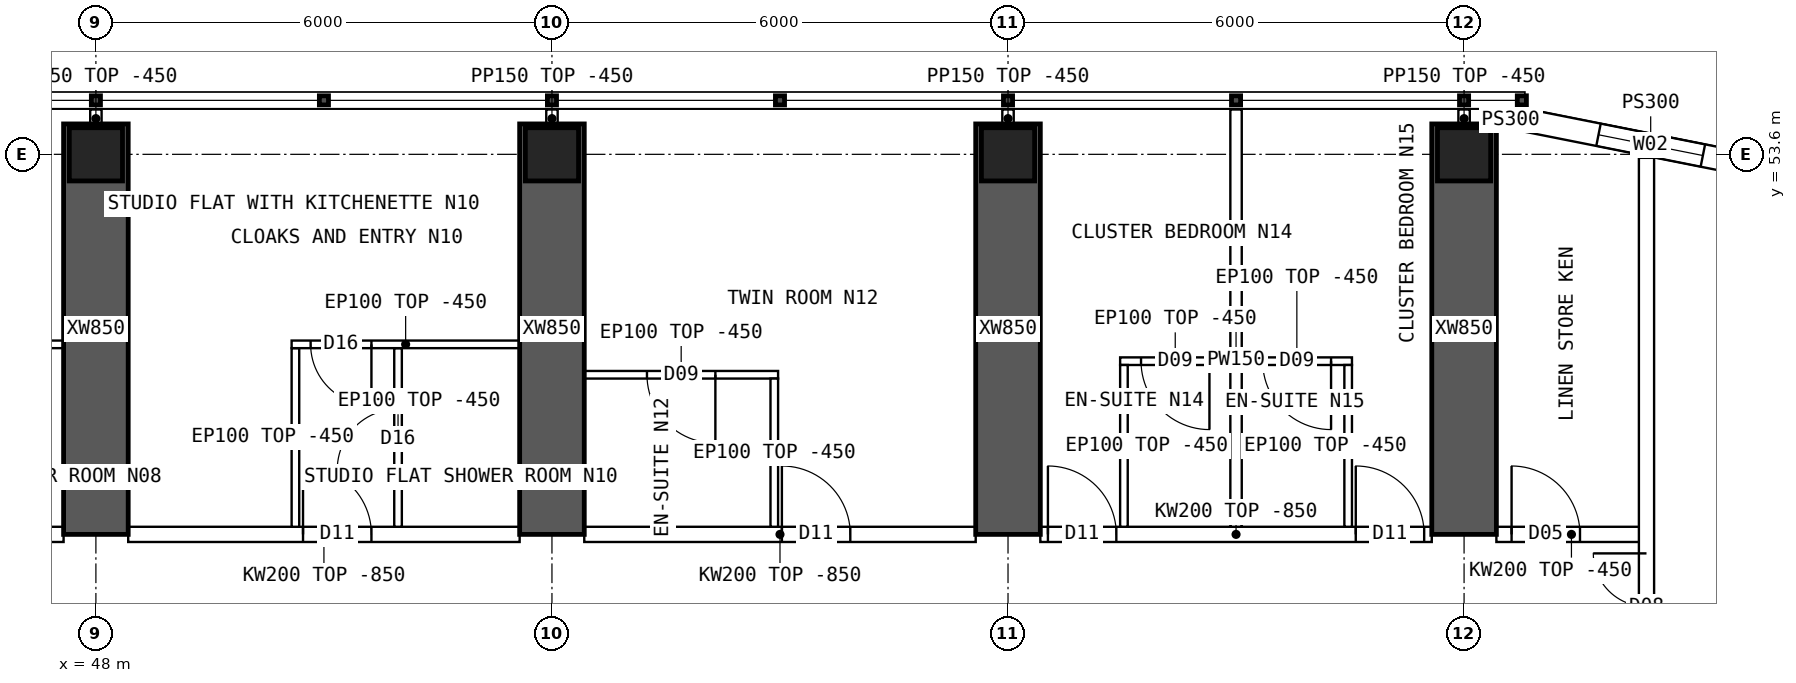
"""IFC4 building model, lengths in metres.
Left out: names, types, materials, properties, quantities, classifications, styles, units other than length and angle.
Written with IfcOpenShell. Run it as: python <this file> out.ifc"""

import sys

from ifc_helpers import new_model, si_unit, direction, frame, frame_2d, origin, origin_2d, place, context, subcontext, project, spatial, polyline, rectangle, hollow_rectangle, outline, extrude, element, fill, save


model = new_model("IFC4")
c1 = context("Model", 3, precision=1e-05, world=origin(), true_north=direction((0.0, 1.0)))
c2 = subcontext(c1, "Body", "Model", "MODEL_VIEW")
j1 = project(units=[si_unit("LENGTHUNIT", "METRE"), si_unit("PLANEANGLEUNIT", "RADIAN")], contexts=[c1])
p1 = place(None, origin())
s1 = spatial("IfcSite", under=j1, at=p1, CompositionType="ELEMENT")
p2 = place(p1, origin())
s2 = spatial("IfcBuilding", under=s1, at=p2, CompositionType="ELEMENT")
p3 = place(p2, frame((0.0, 0.0, 159.85)))
s3 = spatial("IfcBuildingStorey", under=s2, at=p3, CompositionType="ELEMENT", Elevation=159.85)
for number, where, z_axis, x_axis in (
    (1, (48.0, 53.6, 0.0), (0.0, 0.0, 1.0), (1.0, 0.0, 0.0)),
    (2, (54.0, 53.6, 0.0), (0.0, 0.0, 1.0), (1.0, 0.0, 0.0)),
    (3, (60.0, 53.6, 0.0), (0.0, 0.0, 1.0), (1.0, 0.0, 0.0)),
    (4, (66.0, 53.6, 0.0), (0.0, 0.0, 1.0), (1.0, 0.0, 0.0)),
):
    element("IfcColumn", number, at=place(p3, frame(where, z_axis=z_axis, x_axis=x_axis)), inside=s3, PredefinedType="COLUMN", context=c2, shape_type="SweptSolid", body=[
        extrude(hollow_rectangle(XDim=0.7, YDim=0.7, WallThickness=0.07, at=origin_2d()), origin(), (0.0, 0.0, 1.0), 3.75),
    ])
for number, where, z_axis, x_axis in (
    (5, (48.0, 48.6, 0.0), (0.0, 0.0, 1.0), (0.0, 1.0, 0.0)),
    (6, (54.0, 48.6, 0.0), (0.0, 0.0, 1.0), (0.0, 1.0, 0.0)),
    (7, (60.0, 48.6, 0.0), (0.0, 0.0, 1.0), (0.0, 1.0, 0.0)),
    (8, (66.0, 48.6, 0.0), (0.0, 0.0, 1.0), (0.0, 1.0, 0.0)),
):
    element("IfcWall", number, at=place(p3, frame(where, z_axis=z_axis, x_axis=x_axis)), inside=s3, PredefinedType="SHEAR", context=c2, shape_type="SweptSolid", body=[
        extrude(rectangle(XDim=5.4, YDim=0.85, at=frame_2d((2.7, 0.0))), origin(), (0.0, 0.0, 1.0), 3.75),
    ])
p4 = place(p3, frame((70.11, 53.392, 0.0), z_axis=(0.0, 0.0, 1.0), x_axis=(-0.98078325777, 0.195100490205, 0.0)))
e9 = element("IfcWall", 9, at=p4, inside=s3, PredefinedType="SOLIDWALL", context=c2, shape_type="SweptSolid", body=[
    extrude(outline(polyline([(-0.03, -0.15), (3.405, -0.15), (3.345, 0.15), (0.03, 0.15), (-0.03, -0.15)])), origin(), (0.0, 0.0, 1.0), 3.3),
])
p5 = place(p4, frame((0.988, 0.0, 0.9)))
e10 = element("IfcOpeningElement", 10, at=p5, cuts=e9, PredefinedType="OPENING", context=c2, shape_type="SweptSolid", body=[
    extrude(rectangle(XDim=1.4, YDim=1.8, at=frame_2d((0.7, 0.9))), frame((0.0, 0.16, 0.0), z_axis=(0.0, -1.0, 0.0), x_axis=(1.0, 0.0, 0.0)), (0.0, 0.0, 1.0), 0.32),
])
p6 = place(p3, frame((66.8, 54.05, 0.0), z_axis=(0.0, 0.0, 1.0), x_axis=(-1.0, 0.0, 0.0)))
e11 = element("IfcWall", 11, at=p6, inside=s3, PredefinedType="SOLIDWALL", context=c2, shape_type="SweptSolid", body=[
    extrude(rectangle(XDim=0.375, YDim=0.3, at=frame_2d((0.188, 0.0))), origin(), (0.0, 0.0, 1.0), 3.3),
])
p7 = place(p3, frame((42.425, 48.6, 0.0), z_axis=(0.0, 0.0, 1.0), x_axis=(1.0, 0.0, 0.0)))
e12 = element("IfcWall", 12, at=p7, inside=s3, PredefinedType="SOLIDWALL", context=c2, shape_type="SweptSolid", body=[
    extrude(outline(polyline([(0.0, 0.0), (5.15, 0.0), (5.15, 2.9), (0.0, 2.9), (0.0, 0.0)])), frame((0.0, 0.1, 0.0), z_axis=(0.0, -1.0, 0.0), x_axis=(1.0, 0.0, 0.0)), (0.0, 0.0, 1.0), 0.2),
])
p8 = place(p7, frame((2.3, 0.0, 0.0)))
e13 = element("IfcOpeningElement", 13, at=p8, cuts=e12, PredefinedType="OPENING", context=c2, shape_type="SweptSolid", body=[
    extrude(rectangle(XDim=0.9, YDim=2.1, at=frame_2d((0.45, 1.05))), frame((0.0, 0.11, 0.0), z_axis=(0.0, -1.0, 0.0), x_axis=(1.0, 0.0, 0.0)), (0.0, 0.0, 1.0), 0.22),
])
p9 = place(p3, frame((48.425, 48.6, 0.0), z_axis=(0.0, 0.0, 1.0), x_axis=(1.0, 0.0, 0.0)))
e14 = element("IfcWall", 14, at=p9, inside=s3, PredefinedType="SOLIDWALL", context=c2, shape_type="SweptSolid", body=[
    extrude(outline(polyline([(0.0, 0.0), (5.15, 0.0), (5.15, 2.9), (0.0, 2.9), (0.0, 0.0)])), frame((0.0, 0.1, 0.0), z_axis=(0.0, -1.0, 0.0), x_axis=(1.0, 0.0, 0.0)), (0.0, 0.0, 1.0), 0.2),
])
p10 = place(p9, frame((2.3, 0.0, 0.0)))
e15 = element("IfcOpeningElement", 15, at=p10, cuts=e14, PredefinedType="OPENING", context=c2, shape_type="SweptSolid", body=[
    extrude(rectangle(XDim=0.9, YDim=2.1, at=frame_2d((0.45, 1.05))), frame((0.0, 0.11, 0.0), z_axis=(0.0, -1.0, 0.0), x_axis=(1.0, 0.0, 0.0)), (0.0, 0.0, 1.0), 0.22),
])
p11 = place(p3, frame((54.425, 48.6, 0.0), z_axis=(0.0, 0.0, 1.0), x_axis=(1.0, 0.0, 0.0)))
e16 = element("IfcWall", 16, at=p11, inside=s3, PredefinedType="SOLIDWALL", context=c2, shape_type="SweptSolid", body=[
    extrude(outline(polyline([(0.0, 0.0), (5.15, 0.0), (5.15, 2.9), (0.0, 2.9), (0.0, 0.0)])), frame((0.0, 0.1, 0.0), z_axis=(0.0, -1.0, 0.0), x_axis=(1.0, 0.0, 0.0)), (0.0, 0.0, 1.0), 0.2),
])
p12 = place(p11, frame((2.6, 0.0, 0.0)))
e17 = element("IfcOpeningElement", 17, at=p12, cuts=e16, PredefinedType="OPENING", context=c2, shape_type="SweptSolid", body=[
    extrude(rectangle(XDim=0.9, YDim=2.1, at=frame_2d((0.45, 1.05))), frame((0.0, 0.11, 0.0), z_axis=(0.0, -1.0, 0.0), x_axis=(1.0, 0.0, 0.0)), (0.0, 0.0, 1.0), 0.22),
])
p13 = place(p3, frame((60.425, 48.6, 0.0), z_axis=(0.0, 0.0, 1.0), x_axis=(1.0, 0.0, 0.0)))
e18 = element("IfcWall", 18, at=p13, inside=s3, PredefinedType="SOLIDWALL", context=c2, shape_type="SweptSolid", body=[
    extrude(outline(polyline([(0.0, 0.0), (5.15, 0.0), (5.15, 2.9), (0.0, 2.9), (0.0, 0.0)])), frame((0.0, 0.1, 0.0), z_axis=(0.0, -1.0, 0.0), x_axis=(1.0, 0.0, 0.0)), (0.0, 0.0, 1.0), 0.2),
])
p14 = place(p13, frame((0.1, 0.0, 0.0)))
e19 = element("IfcOpeningElement", 19, at=p14, cuts=e18, PredefinedType="OPENING", context=c2, shape_type="SweptSolid", body=[
    extrude(rectangle(XDim=0.9, YDim=2.1, at=frame_2d((0.45, 1.05))), frame((0.0, 0.11, 0.0), z_axis=(0.0, -1.0, 0.0), x_axis=(1.0, 0.0, 0.0)), (0.0, 0.0, 1.0), 0.22),
])
p15 = place(p13, frame((4.15, 0.0, 0.0)))
e20 = element("IfcOpeningElement", 20, at=p15, cuts=e18, PredefinedType="OPENING", context=c2, shape_type="SweptSolid", body=[
    extrude(rectangle(XDim=0.9, YDim=2.1, at=frame_2d((0.45, 1.05))), frame((0.0, 0.11, 0.0), z_axis=(0.0, -1.0, 0.0), x_axis=(1.0, 0.0, 0.0)), (0.0, 0.0, 1.0), 0.22),
])
p16 = place(p3, frame((66.425, 48.6, 0.0), z_axis=(0.0, 0.0, 1.0), x_axis=(1.0, 0.0, 0.0)))
e21 = element("IfcWall", 21, at=p16, inside=s3, PredefinedType="SOLIDWALL", context=c2, shape_type="SweptSolid", body=[
    extrude(rectangle(XDim=1.975, YDim=0.2, at=frame_2d((0.987, 0.0))), origin(), (0.0, 0.0, 1.0), 3.3),
])
p17 = place(p16, frame((0.2, 0.0, 0.0)))
e22 = element("IfcOpeningElement", 22, at=p17, cuts=e21, PredefinedType="OPENING", context=c2, shape_type="SweptSolid", body=[
    extrude(rectangle(XDim=0.9, YDim=2.1, at=frame_2d((0.45, 1.05))), frame((0.0, 0.11, 0.0), z_axis=(0.0, -1.0, 0.0), x_axis=(1.0, 0.0, 0.0)), (0.0, 0.0, 1.0), 0.22),
])
p18 = place(p3, frame((44.575, 51.1, 0.0), z_axis=(0.0, 0.0, 1.0), x_axis=(1.0, 0.0, 0.0)))
e23 = element("IfcWall", 23, at=p18, inside=s3, PredefinedType="PARTITIONING", context=c2, shape_type="SweptSolid", body=[
    extrude(rectangle(XDim=3.0, YDim=0.1, at=frame_2d((1.5, 0.0))), origin(), (0.0, 0.0, 1.0), 3.3),
])
p19 = place(p18, frame((0.25, 0.0, 0.0)))
e24 = element("IfcOpeningElement", 24, at=p19, cuts=e23, PredefinedType="OPENING", context=c2, shape_type="SweptSolid", body=[
    extrude(rectangle(XDim=0.8, YDim=2.1, at=frame_2d((0.4, 1.05))), frame((0.0, 0.06, 0.0), z_axis=(0.0, -1.0, 0.0), x_axis=(1.0, 0.0, 0.0)), (0.0, 0.0, 1.0), 0.12),
])
p20 = place(p3, frame((50.575, 51.1, 0.0), z_axis=(0.0, 0.0, 1.0), x_axis=(1.0, 0.0, 0.0)))
e25 = element("IfcWall", 25, at=p20, inside=s3, PredefinedType="PARTITIONING", context=c2, shape_type="SweptSolid", body=[
    extrude(rectangle(XDim=3.0, YDim=0.1, at=frame_2d((1.5, 0.0))), origin(), (0.0, 0.0, 1.0), 3.3),
])
p21 = place(p20, frame((0.25, 0.0, 0.0)))
e26 = element("IfcOpeningElement", 26, at=p21, cuts=e25, PredefinedType="OPENING", context=c2, shape_type="SweptSolid", body=[
    extrude(rectangle(XDim=0.8, YDim=2.1, at=frame_2d((0.4, 1.05))), frame((0.0, 0.06, 0.0), z_axis=(0.0, -1.0, 0.0), x_axis=(1.0, 0.0, 0.0)), (0.0, 0.0, 1.0), 0.12),
])
p22 = place(p3, frame((50.625, 51.05, 0.0), z_axis=(0.0, 0.0, 1.0), x_axis=(0.0, -1.0, 0.0)))
e27 = element("IfcWall", 27, at=p22, inside=s3, PredefinedType="PARTITIONING", context=c2, shape_type="SweptSolid", body=[
    extrude(outline(polyline([(0.0, 0.0), (2.35, 0.0), (2.35, 2.9), (2.302, 2.9), (2.3, 3.3), (0.0, 3.3), (0.0, 0.0)])), frame((0.0, 0.05, 0.0), z_axis=(0.0, -1.0, 0.0), x_axis=(1.0, 0.0, 0.0)), (0.0, 0.0, 1.0), 0.1),
])
p23 = place(p3, frame((51.975, 51.05, 0.0), z_axis=(0.0, 0.0, 1.0), x_axis=(0.0, -1.0, 0.0)))
e28 = element("IfcWall", 28, at=p23, inside=s3, PredefinedType="PARTITIONING", context=c2, shape_type="SweptSolid", body=[
    extrude(outline(polyline([(0.0, 0.0), (2.35, 0.0), (2.35, 2.9), (2.302, 2.9), (2.3, 3.3), (0.0, 3.3), (0.0, 0.0)])), frame((0.0, 0.05, 0.0), z_axis=(0.0, -1.0, 0.0), x_axis=(1.0, 0.0, 0.0)), (0.0, 0.0, 1.0), 0.1),
])
p24 = place(p23, frame((0.8, 0.0, 0.0)))
e29 = element("IfcOpeningElement", 29, at=p24, cuts=e28, PredefinedType="OPENING", context=c2, shape_type="SweptSolid", body=[
    extrude(rectangle(XDim=0.8, YDim=2.1, at=frame_2d((0.4, 1.05))), frame((0.0, 0.06, 0.0), z_axis=(0.0, -1.0, 0.0), x_axis=(1.0, 0.0, 0.0)), (0.0, 0.0, 1.0), 0.12),
])
p25 = place(p3, frame((54.425, 50.7, 0.0), z_axis=(0.0, 0.0, 1.0), x_axis=(1.0, 0.0, 0.0)))
e30 = element("IfcWall", 30, at=p25, inside=s3, PredefinedType="PARTITIONING", context=c2, shape_type="SweptSolid", body=[
    extrude(rectangle(XDim=2.55, YDim=0.1, at=frame_2d((1.275, 0.0))), origin(), (0.0, 0.0, 1.0), 3.3),
])
p26 = place(p25, frame((0.825, 0.0, 0.0)))
e31 = element("IfcOpeningElement", 31, at=p26, cuts=e30, PredefinedType="OPENING", context=c2, shape_type="SweptSolid", body=[
    extrude(rectangle(XDim=0.9, YDim=2.1, at=frame_2d((0.45, 1.05))), frame((0.0, 0.06, 0.0), z_axis=(0.0, -1.0, 0.0), x_axis=(1.0, 0.0, 0.0)), (0.0, 0.0, 1.0), 0.12),
])
p27 = place(p3, frame((56.925, 50.65, 0.0), z_axis=(0.0, 0.0, 1.0), x_axis=(0.0, -1.0, 0.0)))
e32 = element("IfcWall", 32, at=p27, inside=s3, PredefinedType="PARTITIONING", context=c2, shape_type="SweptSolid", body=[
    extrude(outline(polyline([(0.0, 0.0), (1.95, 0.0), (1.95, 2.9), (1.902, 2.9), (1.9, 3.3), (0.0, 3.3), (0.0, 0.0)])), frame((0.0, 0.05, 0.0), z_axis=(0.0, -1.0, 0.0), x_axis=(1.0, 0.0, 0.0)), (0.0, 0.0, 1.0), 0.1),
])
p28 = place(p3, frame((63.0, 54.19, 0.0), z_axis=(0.0, 0.0, 1.0), x_axis=(0.0, -1.0, 0.0)))
e33 = element("IfcWall", 33, at=p28, inside=s3, PredefinedType="PARTITIONING", context=c2, shape_type="SweptSolid", body=[
    extrude(outline(polyline([(0.0, 0.0), (5.49, 0.0), (5.49, 2.9), (5.442, 2.9), (5.44, 3.3), (0.792, 3.3), (0.79, 2.9), (0.392, 2.9), (0.39, 3.3), (0.0, 3.3), (0.0, 0.0)])), frame((0.0, 0.075, 0.0), z_axis=(0.0, -1.0, 0.0), x_axis=(1.0, 0.0, 0.0)), (0.0, 0.0, 1.0), 0.15),
])
p29 = place(p3, frame((61.475, 50.879, 0.0), z_axis=(0.0, 0.0, 1.0), x_axis=(1.0, 0.0, 0.0)))
e34 = element("IfcWall", 34, at=p29, inside=s3, PredefinedType="PARTITIONING", context=c2, shape_type="SweptSolid", body=[
    extrude(rectangle(XDim=1.45, YDim=0.1, at=frame_2d((0.725, 0.0))), origin(), (0.0, 0.0, 1.0), 3.3),
])
p30 = place(p29, frame((0.275, 0.0, 0.0)))
e35 = element("IfcOpeningElement", 35, at=p30, cuts=e34, PredefinedType="OPENING", context=c2, shape_type="SweptSolid", body=[
    extrude(rectangle(XDim=0.9, YDim=2.1, at=frame_2d((0.45, 1.05))), frame((0.0, 0.06, 0.0), z_axis=(0.0, -1.0, 0.0), x_axis=(1.0, 0.0, 0.0)), (0.0, 0.0, 1.0), 0.12),
])
p31 = place(p3, frame((61.525, 50.829, 0.0), z_axis=(0.0, 0.0, 1.0), x_axis=(0.0, -1.0, 0.0)))
e36 = element("IfcWall", 36, at=p31, inside=s3, PredefinedType="PARTITIONING", context=c2, shape_type="SweptSolid", body=[
    extrude(outline(polyline([(0.0, 0.0), (2.129, 0.0), (2.129, 2.9), (2.081, 2.9), (2.079, 3.3), (0.0, 3.3), (0.0, 0.0)])), frame((0.0, 0.05, 0.0), z_axis=(0.0, -1.0, 0.0), x_axis=(1.0, 0.0, 0.0)), (0.0, 0.0, 1.0), 0.1),
])
p32 = place(p3, frame((63.075, 50.879, 0.0), z_axis=(0.0, 0.0, 1.0), x_axis=(1.0, 0.0, 0.0)))
e37 = element("IfcWall", 37, at=p32, inside=s3, PredefinedType="PARTITIONING", context=c2, shape_type="SweptSolid", body=[
    extrude(rectangle(XDim=1.45, YDim=0.1, at=frame_2d((0.725, 0.0))), origin(), (0.0, 0.0, 1.0), 3.3),
])
p33 = place(p32, frame((0.275, 0.0, 0.0)))
e38 = element("IfcOpeningElement", 38, at=p33, cuts=e37, PredefinedType="OPENING", context=c2, shape_type="SweptSolid", body=[
    extrude(rectangle(XDim=0.9, YDim=2.1, at=frame_2d((0.45, 1.05))), frame((0.0, 0.06, 0.0), z_axis=(0.0, -1.0, 0.0), x_axis=(1.0, 0.0, 0.0)), (0.0, 0.0, 1.0), 0.12),
])
p34 = place(p3, frame((64.475, 50.829, 0.0), z_axis=(0.0, 0.0, 1.0), x_axis=(0.0, -1.0, 0.0)))
e39 = element("IfcWall", 39, at=p34, inside=s3, PredefinedType="PARTITIONING", context=c2, shape_type="SweptSolid", body=[
    extrude(outline(polyline([(0.0, 0.0), (2.129, 0.0), (2.129, 2.9), (2.081, 2.9), (2.079, 3.3), (0.0, 3.3), (0.0, 0.0)])), frame((0.0, 0.05, 0.0), z_axis=(0.0, -1.0, 0.0), x_axis=(1.0, 0.0, 0.0)), (0.0, 0.0, 1.0), 0.1),
])
p35 = place(p3, frame((68.4, 10.446, 0.0), z_axis=(0.0, 0.0, 1.0), x_axis=(0.0, 1.0, 0.0)))
e40 = element("IfcWall", 40, at=p35, inside=s3, PredefinedType="SOLIDWALL", context=c2, shape_type="SweptSolid", body=[
    extrude(rectangle(XDim=43.107, YDim=0.2, at=frame_2d((21.554, 0.0))), origin(), (0.0, 0.0, 1.0), 3.3),
])
p36 = place(p35, frame((13.914, 0.0, 0.0)))
e41 = element("IfcOpeningElement", 41, at=p36, cuts=e40, PredefinedType="OPENING", context=c2, shape_type="SweptSolid", body=[
    extrude(rectangle(XDim=1.2, YDim=2.1, at=frame_2d((0.6, 1.05))), frame((0.0, 0.11, 0.0), z_axis=(0.0, -1.0, 0.0), x_axis=(1.0, 0.0, 0.0)), (0.0, 0.0, 1.0), 0.22),
])
p37 = place(p35, frame((22.634, 0.0, 0.0)))
e42 = element("IfcOpeningElement", 42, at=p37, cuts=e40, PredefinedType="OPENING", context=c2, shape_type="SweptSolid", body=[
    extrude(rectangle(XDim=1.2, YDim=2.1, at=frame_2d((0.6, 1.05))), frame((0.0, 0.11, 0.0), z_axis=(0.0, -1.0, 0.0), x_axis=(1.0, 0.0, 0.0)), (0.0, 0.0, 1.0), 0.22),
])
p38 = place(p35, frame((5.104, 0.0, 0.0)))
e43 = element("IfcOpeningElement", 43, at=p38, cuts=e40, PredefinedType="OPENING", context=c2, shape_type="SweptSolid", body=[
    extrude(rectangle(XDim=1.4, YDim=2.1, at=frame_2d((0.7, 1.05))), frame((0.0, 0.11, 0.0), z_axis=(0.0, -1.0, 0.0), x_axis=(1.0, 0.0, 0.0)), (0.0, 0.0, 1.0), 0.22),
])
p39 = place(p35, frame((36.504, 0.0, 0.0)))
e44 = element("IfcOpeningElement", 44, at=p39, cuts=e40, PredefinedType="OPENING", context=c2, shape_type="SweptSolid", body=[
    extrude(rectangle(XDim=1.4, YDim=2.1, at=frame_2d((0.7, 1.05))), frame((0.0, 0.11, 0.0), z_axis=(0.0, -1.0, 0.0), x_axis=(1.0, 0.0, 0.0)), (0.0, 0.0, 1.0), 0.22),
])
for number, where, z_axis, x_axis in (
    (45, (48.0, 53.95, 0.0), (0.0, 0.0, 1.0), (0.0, 1.0, 0.0)),
    (46, (54.0, 53.95, 0.0), (0.0, 0.0, 1.0), (0.0, 1.0, 0.0)),
    (47, (60.0, 53.95, 0.0), (0.0, 0.0, 1.0), (0.0, 1.0, 0.0)),
    (48, (66.0, 53.95, 0.0), (0.0, 0.0, 1.0), (0.0, 1.0, 0.0)),
):
    element("IfcWall", number, at=place(p3, frame(where, z_axis=z_axis, x_axis=x_axis)), inside=s3, PredefinedType="PARTITIONING", context=c2, shape_type="SweptSolid", body=[
        extrude(rectangle(XDim=0.24, YDim=0.15, at=frame_2d((0.12, 0.0))), origin(), (0.0, 0.0, 1.0), 3.3),
    ])
p40 = place(p5, origin())
e49 = element("IfcWindow", 49, at=p40, inside=s3, PartitioningType="SINGLE_PANEL", PredefinedType="WINDOW", context=c2, shape_type="SweptSolid", body=[
    extrude(rectangle(XDim=1.4, YDim=1.8, at=frame_2d((0.7, 0.9))), frame((0.0, 0.03, 0.0), z_axis=(0.0, -1.0, 0.0), x_axis=(1.0, 0.0, 0.0)), (0.0, 0.0, 1.0), 0.06),
])
fill(e10, e49)
p41 = place(p21, origin())
e50 = element("IfcDoor", 50, at=p41, inside=s3, OperationType="SINGLE_SWING_RIGHT", PredefinedType="DOOR", context=c2, shape_type="SweptSolid", body=[
    extrude(rectangle(XDim=0.8, YDim=2.1, at=frame_2d((0.4, 1.05))), frame((0.0, 0.025, 0.0), z_axis=(0.0, -1.0, 0.0), x_axis=(1.0, 0.0, 0.0)), (0.0, 0.0, 1.0), 0.05),
])
fill(e26, e50)
p42 = place(p24, origin())
e51 = element("IfcDoor", 51, at=p42, inside=s3, OperationType="SINGLE_SWING_RIGHT", PredefinedType="DOOR", context=c2, shape_type="SweptSolid", body=[
    extrude(rectangle(XDim=0.8, YDim=2.1, at=frame_2d((0.4, 1.05))), frame((0.0, 0.025, 0.0), z_axis=(0.0, -1.0, 0.0), x_axis=(1.0, 0.0, 0.0)), (0.0, 0.0, 1.0), 0.05),
])
fill(e29, e51)
p43 = place(p10, origin())
e52 = element("IfcDoor", 52, at=p43, inside=s3, OperationType="SINGLE_SWING_LEFT", PredefinedType="DOOR", context=c2, shape_type="SweptSolid", body=[
    extrude(rectangle(XDim=0.9, YDim=2.1, at=frame_2d((0.45, 1.05))), frame((0.0, 0.025, 0.0), z_axis=(0.0, -1.0, 0.0), x_axis=(1.0, 0.0, 0.0)), (0.0, 0.0, 1.0), 0.05),
])
fill(e15, e52)
p44 = place(p26, origin())
e53 = element("IfcDoor", 53, at=p44, inside=s3, OperationType="SINGLE_SWING_RIGHT", PredefinedType="DOOR", context=c2, shape_type="SweptSolid", body=[
    extrude(rectangle(XDim=0.9, YDim=2.1, at=frame_2d((0.45, 1.05))), frame((0.0, 0.025, 0.0), z_axis=(0.0, -1.0, 0.0), x_axis=(1.0, 0.0, 0.0)), (0.0, 0.0, 1.0), 0.05),
])
fill(e31, e53)
p45 = place(p12, origin())
e54 = element("IfcDoor", 54, at=p45, inside=s3, OperationType="SINGLE_SWING_LEFT", PredefinedType="DOOR", context=c2, shape_type="SweptSolid", body=[
    extrude(rectangle(XDim=0.9, YDim=2.1, at=frame_2d((0.45, 1.05))), frame((0.0, 0.025, 0.0), z_axis=(0.0, -1.0, 0.0), x_axis=(1.0, 0.0, 0.0)), (0.0, 0.0, 1.0), 0.05),
])
fill(e17, e54)
p46 = place(p30, origin())
e55 = element("IfcDoor", 55, at=p46, inside=s3, OperationType="SINGLE_SWING_RIGHT", PredefinedType="DOOR", context=c2, shape_type="SweptSolid", body=[
    extrude(rectangle(XDim=0.9, YDim=2.1, at=frame_2d((0.45, 1.05))), frame((0.0, 0.025, 0.0), z_axis=(0.0, -1.0, 0.0), x_axis=(1.0, 0.0, 0.0)), (0.0, 0.0, 1.0), 0.05),
])
fill(e35, e55)
p47 = place(p14, origin())
e56 = element("IfcDoor", 56, at=p47, inside=s3, OperationType="SINGLE_SWING_LEFT", PredefinedType="DOOR", context=c2, shape_type="SweptSolid", body=[
    extrude(rectangle(XDim=0.9, YDim=2.1, at=frame_2d((0.45, 1.05))), frame((0.0, 0.025, 0.0), z_axis=(0.0, -1.0, 0.0), x_axis=(1.0, 0.0, 0.0)), (0.0, 0.0, 1.0), 0.05),
])
fill(e19, e56)
p48 = place(p33, origin())
e57 = element("IfcDoor", 57, at=p48, inside=s3, OperationType="SINGLE_SWING_RIGHT", PredefinedType="DOOR", context=c2, shape_type="SweptSolid", body=[
    extrude(rectangle(XDim=0.9, YDim=2.1, at=frame_2d((0.45, 1.05))), frame((0.0, 0.025, 0.0), z_axis=(0.0, -1.0, 0.0), x_axis=(1.0, 0.0, 0.0)), (0.0, 0.0, 1.0), 0.05),
])
fill(e38, e57)
p49 = place(p15, origin())
e58 = element("IfcDoor", 58, at=p49, inside=s3, OperationType="SINGLE_SWING_LEFT", PredefinedType="DOOR", context=c2, shape_type="SweptSolid", body=[
    extrude(rectangle(XDim=0.9, YDim=2.1, at=frame_2d((0.45, 1.05))), frame((0.0, 0.025, 0.0), z_axis=(0.0, -1.0, 0.0), x_axis=(1.0, 0.0, 0.0)), (0.0, 0.0, 1.0), 0.05),
])
fill(e20, e58)
p50 = place(p39, origin())
e59 = element("IfcDoor", 59, at=p50, inside=s3, OperationType="DOUBLE_DOOR_SINGLE_SWING", PredefinedType="DOOR", context=c2, shape_type="SweptSolid", body=[
    extrude(rectangle(XDim=1.4, YDim=2.1, at=frame_2d((0.7, 1.05))), frame((0.0, 0.025, 0.0), z_axis=(0.0, -1.0, 0.0), x_axis=(1.0, 0.0, 0.0)), (0.0, 0.0, 1.0), 0.05),
])
fill(e44, e59)
p51 = place(p17, origin())
e60 = element("IfcDoor", 60, at=p51, inside=s3, OperationType="SINGLE_SWING_LEFT", PredefinedType="DOOR", context=c2, shape_type="SweptSolid", body=[
    extrude(rectangle(XDim=0.9, YDim=2.1, at=frame_2d((0.45, 1.05))), frame((0.0, 0.025, 0.0), z_axis=(0.0, -1.0, 0.0), x_axis=(1.0, 0.0, 0.0)), (0.0, 0.0, 1.0), 0.05),
])
fill(e22, e60)
save(model, sys.argv[1])
